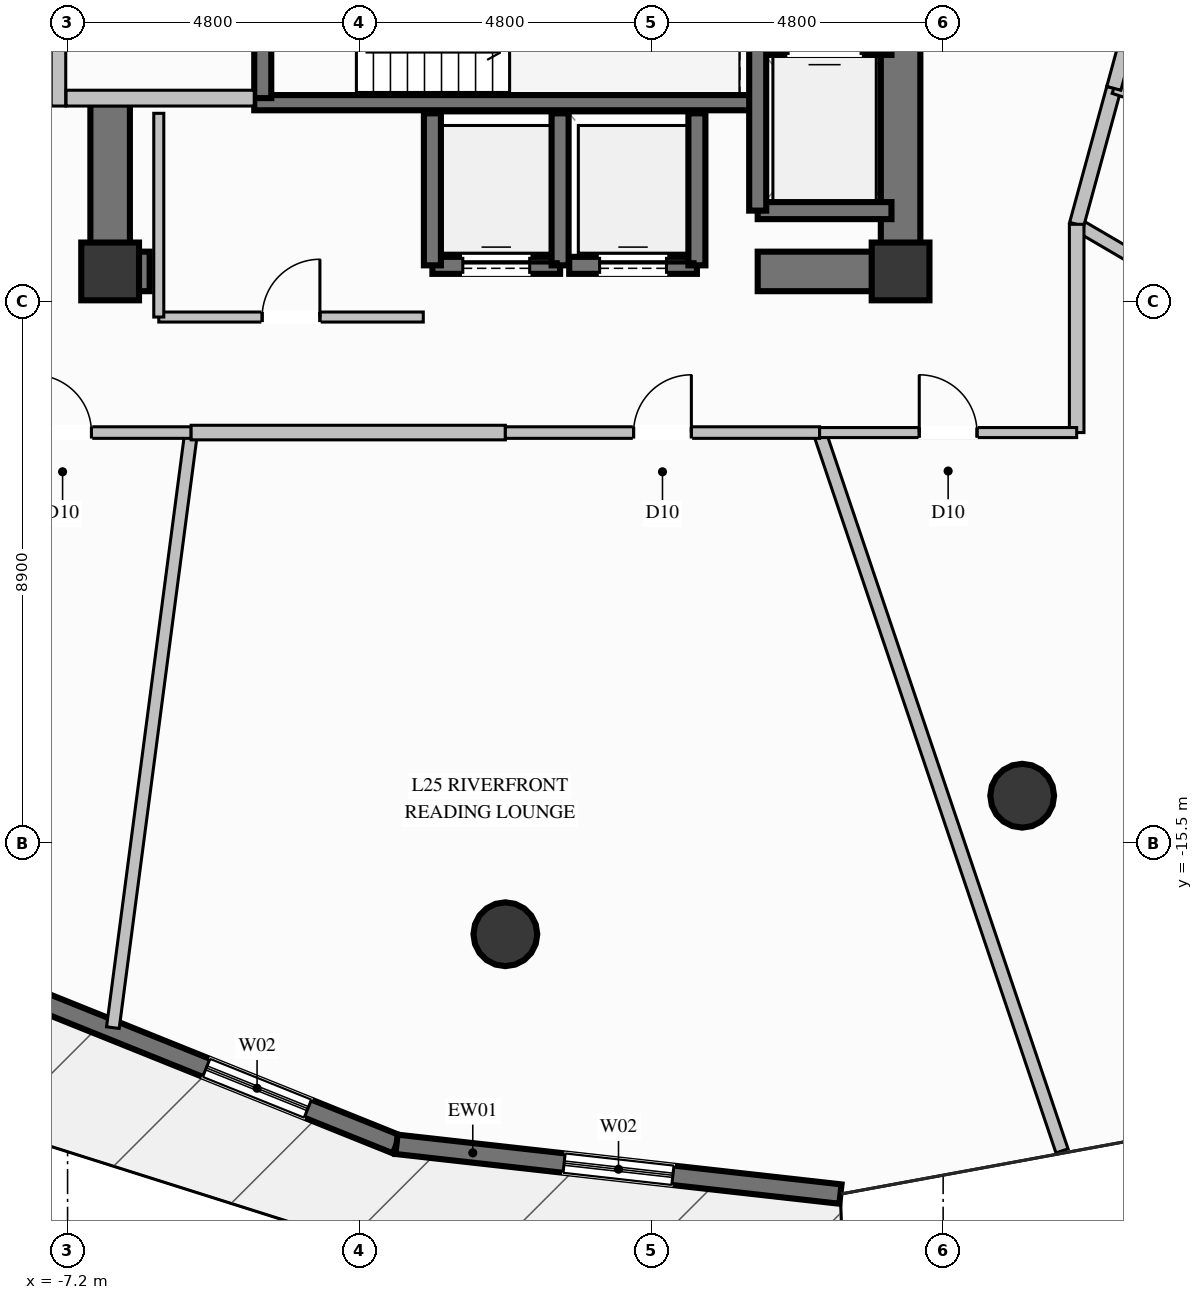
"""IFC4 building model, lengths in metres.
Left out: names, types, materials, properties, quantities, classifications, styles, units other than length and angle.
Written with IfcOpenShell. Run it as: python <this file> out.ifc"""

import sys

from ifc_helpers import new_model, si_unit, direction, frame, frame_2d, origin, origin_2d, place, context, subcontext, project, spatial, rectangle, circle, extrude, element, fill, save


model = new_model("IFC4")
c1 = context("Model", 3, precision=1e-05, world=origin(), true_north=direction((0.0, 1.0)))
c2 = subcontext(c1, "Body", "Model", "MODEL_VIEW")
j1 = project(units=[si_unit("LENGTHUNIT", "METRE"), si_unit("PLANEANGLEUNIT", "RADIAN")], contexts=[c1])
p1 = place(None, origin())
s1 = spatial("IfcSite", under=j1, at=p1, CompositionType="ELEMENT")
p2 = place(p1, origin())
s2 = spatial("IfcBuilding", under=s1, at=p2, CompositionType="ELEMENT")
p3 = place(p2, frame((0.0, 0.0, 102.6)))
s3 = spatial("IfcBuildingStorey", under=s2, at=p3, CompositionType="ELEMENT", Elevation=102.6)
for number, where, z_axis, x_axis in (
    (1, (-6.5, -6.1, 0.0), (0.0, 0.0, 1.0), (1.0, 0.0, 0.0)),
    (2, (6.5, -6.1, 0.0), (0.0, 0.0, 1.0), (1.0, 0.0, 0.0)),
):
    element("IfcColumn", number, at=place(p3, frame(where, z_axis=z_axis, x_axis=x_axis)), inside=s3, PredefinedType="COLUMN", context=c2, shape_type="SweptSolid", body=[
        extrude(rectangle(XDim=0.95, YDim=0.95, at=origin_2d()), origin(), (0.0, 0.0, 1.0), 3.6),
    ])
p4 = place(p3, frame((-4.13, -3.325, 0.0), z_axis=(0.0, 0.0, 1.0), x_axis=(1.0, 0.0, 0.0)))
e3 = element("IfcWall", 3, at=p4, inside=s3, PredefinedType="SOLIDWALL", context=c2, shape_type="SweptSolid", body=[
    extrude(rectangle(XDim=8.26, YDim=0.25, at=frame_2d((4.13, 0.0))), origin(), (0.0, 0.0, 1.0), 3.6),
])
p5 = place(p3, frame((-6.175, -6.1, 0.0), z_axis=(0.0, 0.0, 1.0), x_axis=(1.0, 0.0, 0.0)))
e4 = element("IfcWall", 4, at=p5, inside=s3, PredefinedType="SHEAR", context=c2, shape_type="SweptSolid", body=[
    extrude(rectangle(XDim=0.325, YDim=0.65, at=frame_2d((0.163, 0.0))), origin(), (0.0, 0.0, 1.0), 3.6),
])
p6 = place(p3, frame((4.15, -6.1, 0.0), z_axis=(0.0, 0.0, 1.0), x_axis=(1.0, 0.0, 0.0)))
e5 = element("IfcWall", 5, at=p6, inside=s3, PredefinedType="SHEAR", context=c2, shape_type="SweptSolid", body=[
    extrude(rectangle(XDim=2.025, YDim=0.65, at=frame_2d((1.013, 0.0))), origin(), (0.0, 0.0, 1.0), 3.6),
])
p7 = place(p3, frame((-6.5, -6.425, 0.0), z_axis=(0.0, 0.0, 1.0), x_axis=(0.0, 1.0, 0.0)))
e6 = element("IfcWall", 6, at=p7, inside=s3, PredefinedType="SHEAR", context=c2, shape_type="SweptSolid", body=[
    extrude(rectangle(XDim=3.075, YDim=0.65, at=frame_2d((1.538, 0.0))), origin(), (0.0, 0.0, 1.0), 3.6),
])
p8 = place(p3, frame((6.5, -6.425, 0.0), z_axis=(0.0, 0.0, 1.0), x_axis=(0.0, 1.0, 0.0)))
e7 = element("IfcWall", 7, at=p8, inside=s3, PredefinedType="SHEAR", context=c2, shape_type="SweptSolid", body=[
    extrude(rectangle(XDim=4.075, YDim=0.65, at=frame_2d((2.038, 0.0))), origin(), (0.0, 0.0, 1.0), 3.6),
])
for number, where, z_axis, x_axis in (
    (8, (0.0, -17.0, 0.0), (0.0, 0.0, 1.0), (1.0, 0.0, 0.0)),
    (9, (8.5, -14.722, 0.0), (0.0, 0.0, 1.0), (1.0, 0.0, 0.0)),
):
    element("IfcColumn", number, at=place(p3, frame(where, z_axis=z_axis, x_axis=x_axis)), inside=s3, PredefinedType="COLUMN", context=c2, shape_type="SweptSolid", body=[
        extrude(circle(Radius=0.525, at=origin_2d()), origin(), (0.0, 0.0, 1.0), 3.6),
    ])
p9 = place(p3, frame((-1.79, -20.455, 0.0), z_axis=(0.0, 0.0, 1.0), x_axis=(-0.927795739468, 0.373088549577, 0.0)))
e10 = element("IfcWall", 10, at=p9, inside=s3, PredefinedType="SOLIDWALL", context=c2, shape_type="SweptSolid", body=[
    extrude(rectangle(XDim=7.559, YDim=0.32, at=frame_2d((3.779, 0.0))), origin(), (0.0, 0.0, 1.0), 3.35),
])
p10 = place(p9, frame((1.572, 0.0, 0.35)))
e11 = element("IfcOpeningElement", 11, at=p10, cuts=e10, PredefinedType="OPENING", context=c2, shape_type="SweptSolid", body=[
    extrude(rectangle(XDim=1.8, YDim=2.6, at=frame_2d((0.9, 1.3))), frame((0.0, 0.17, 0.0), z_axis=(0.0, -1.0, 0.0), x_axis=(1.0, 0.0, 0.0)), (0.0, 0.0, 1.0), 0.34),
])
p11 = place(p3, frame((5.511, -21.273, 0.0), z_axis=(0.0, 0.0, 1.0), x_axis=(-0.993784044115, 0.111325081016, 0.0)))
e12 = element("IfcWall", 12, at=p11, inside=s3, PredefinedType="SOLIDWALL", context=c2, shape_type="SweptSolid", body=[
    extrude(rectangle(XDim=7.347, YDim=0.32, at=frame_2d((3.673, 0.0))), origin(), (0.0, 0.0, 1.0), 3.35),
])
p12 = place(p11, frame((2.773, 0.0, 0.35)))
e13 = element("IfcOpeningElement", 13, at=p12, cuts=e12, PredefinedType="OPENING", context=c2, shape_type="SweptSolid", body=[
    extrude(rectangle(XDim=1.8, YDim=2.6, at=frame_2d((0.9, 1.3))), frame((0.0, 0.17, 0.0), z_axis=(0.0, -1.0, 0.0), x_axis=(1.0, 0.0, 0.0)), (0.0, 0.0, 1.0), 0.34),
])
p13 = place(p3, frame((-1.2, -6.0, 0.0), z_axis=(0.0, 0.0, 1.0), x_axis=(1.0, 0.0, 0.0)))
e14 = element("IfcWall", 14, at=p13, inside=s3, PredefinedType="SOLIDWALL", context=c2, shape_type="SweptSolid", body=[
    extrude(rectangle(XDim=2.1, YDim=0.28, at=frame_2d((1.05, 0.0))), origin(), (0.0, 0.0, 1.0), 3.35),
])
p14 = place(p13, frame((0.5, 0.0, 0.0)))
e15 = element("IfcOpeningElement", 15, at=p14, cuts=e14, PredefinedType="OPENING", context=c2, shape_type="SweptSolid", body=[
    extrude(rectangle(XDim=1.1, YDim=2.2, at=frame_2d((0.55, 1.1))), frame((0.0, 0.15, 0.0), z_axis=(0.0, -1.0, 0.0), x_axis=(1.0, 0.0, 0.0)), (0.0, 0.0, 1.0), 0.3),
])
for number, where, z_axis, x_axis in (
    (16, (-1.2, -3.5, 0.0), (0.0, 0.0, 1.0), (0.0, -1.0, 0.0)),
    (17, (0.9, -6.0, 0.0), (0.0, 0.0, 1.0), (0.0, 1.0, 0.0)),
):
    element("IfcWall", number, at=place(p3, frame(where, z_axis=z_axis, x_axis=x_axis)), inside=s3, PredefinedType="SOLIDWALL", context=c2, shape_type="SweptSolid", body=[
        extrude(rectangle(XDim=2.5, YDim=0.28, at=frame_2d((1.25, 0.0))), origin(), (0.0, 0.0, 1.0), 3.35),
    ])
p15 = place(p3, frame((1.05, -6.0, 0.0), z_axis=(0.0, 0.0, 1.0), x_axis=(1.0, 0.0, 0.0)))
e18 = element("IfcWall", 18, at=p15, inside=s3, PredefinedType="SOLIDWALL", context=c2, shape_type="SweptSolid", body=[
    extrude(rectangle(XDim=2.1, YDim=0.28, at=frame_2d((1.05, 0.0))), origin(), (0.0, 0.0, 1.0), 3.35),
])
p16 = place(p15, frame((0.5, 0.0, 0.0)))
e19 = element("IfcOpeningElement", 19, at=p16, cuts=e18, PredefinedType="OPENING", context=c2, shape_type="SweptSolid", body=[
    extrude(rectangle(XDim=1.1, YDim=2.2, at=frame_2d((0.55, 1.1))), frame((0.0, 0.15, 0.0), z_axis=(0.0, -1.0, 0.0), x_axis=(1.0, 0.0, 0.0)), (0.0, 0.0, 1.0), 0.3),
])
p17 = place(p3, frame((3.15, -6.0, 0.0), z_axis=(0.0, 0.0, 1.0), x_axis=(0.0, 1.0, 0.0)))
e20 = element("IfcWall", 20, at=p17, inside=s3, PredefinedType="SOLIDWALL", context=c2, shape_type="SweptSolid", body=[
    extrude(rectangle(XDim=2.5, YDim=0.28, at=frame_2d((1.25, 0.0))), origin(), (0.0, 0.0, 1.0), 3.35),
])
p18 = place(p3, frame((4.15, -5.1, 0.0), z_axis=(0.0, 0.0, 1.0), x_axis=(1.0, 0.0, 0.0)))
e21 = element("IfcWall", 21, at=p18, inside=s3, PredefinedType="SOLIDWALL", context=c2, shape_type="SweptSolid", body=[
    extrude(rectangle(XDim=2.2, YDim=0.28, at=frame_2d((1.1, 0.0))), origin(), (0.0, 0.0, 1.0), 3.35),
])
p19 = place(p3, frame((6.35, -2.4, 0.0), z_axis=(0.0, 0.0, 1.0), x_axis=(-1.0, 0.0, 0.0)))
e22 = element("IfcWall", 22, at=p19, inside=s3, PredefinedType="SOLIDWALL", context=c2, shape_type="SweptSolid", body=[
    extrude(rectangle(XDim=2.2, YDim=0.28, at=frame_2d((1.1, 0.0))), origin(), (0.0, 0.0, 1.0), 3.35),
])
p20 = place(p19, frame((0.5, 0.0, 0.0)))
e23 = element("IfcOpeningElement", 23, at=p20, cuts=e22, PredefinedType="OPENING", context=c2, shape_type="SweptSolid", body=[
    extrude(rectangle(XDim=1.2, YDim=2.2, at=frame_2d((0.6, 1.1))), frame((0.0, 0.15, 0.0), z_axis=(0.0, -1.0, 0.0), x_axis=(1.0, 0.0, 0.0)), (0.0, 0.0, 1.0), 0.3),
])
p21 = place(p3, frame((4.15, -2.4, 0.0), z_axis=(0.0, 0.0, 1.0), x_axis=(0.0, -1.0, 0.0)))
e24 = element("IfcWall", 24, at=p21, inside=s3, PredefinedType="SOLIDWALL", context=c2, shape_type="SweptSolid", body=[
    extrude(rectangle(XDim=2.7, YDim=0.28, at=frame_2d((1.35, 0.0))), origin(), (0.0, 0.0, 1.0), 3.35),
])
p22 = place(p3, frame((-3.99, -3.25, 0.0), z_axis=(0.0, 0.0, 1.0), x_axis=(0.0, 1.0, 0.0)))
e25 = element("IfcWall", 25, at=p22, inside=s3, PredefinedType="SOLIDWALL", context=c2, shape_type="SweptSolid", body=[
    extrude(rectangle(XDim=5.46, YDim=0.28, at=frame_2d((2.73, 0.0))), origin(), (0.0, 0.0, 1.0), 3.35),
])
p23 = place(p22, frame((0.937, 0.0, 0.0)))
e26 = element("IfcOpeningElement", 26, at=p23, cuts=e25, PredefinedType="OPENING", context=c2, shape_type="SweptSolid", body=[
    extrude(rectangle(XDim=1.2, YDim=2.2, at=frame_2d((0.6, 1.1))), frame((0.0, 0.15, 0.0), z_axis=(0.0, -1.0, 0.0), x_axis=(1.0, 0.0, 0.0)), (0.0, 0.0, 1.0), 0.3),
])
p24 = place(p3, frame((-7.35, -3.38, 0.0), z_axis=(0.0, 0.0, 1.0), x_axis=(0.0, 1.0, 0.0)))
e27 = element("IfcWall", 27, at=p24, inside=s3, PredefinedType="PARTITIONING", context=c2, shape_type="SweptSolid", body=[
    extrude(rectangle(XDim=5.72, YDim=0.24, at=frame_2d((2.86, 0.0))), origin(), (0.0, 0.0, 1.0), 2.435),
])
p25 = place(p24, frame((1.599, 0.0, 0.0)))
e28 = element("IfcOpeningElement", 28, at=p25, cuts=e27, PredefinedType="OPENING", context=c2, shape_type="SweptSolid", body=[
    extrude(rectangle(XDim=1.15, YDim=2.2, at=frame_2d((0.575, 1.1))), frame((0.0, 0.13, 0.0), z_axis=(0.0, -1.0, 0.0), x_axis=(1.0, 0.0, 0.0)), (0.0, 0.0, 1.0), 0.26),
])
p26 = place(p3, frame((-7.225, -3.25, 0.0), z_axis=(0.0, 0.0, 1.0), x_axis=(1.0, 0.0, 0.0)))
e29 = element("IfcWall", 29, at=p26, inside=s3, PredefinedType="PARTITIONING", context=c2, shape_type="SweptSolid", body=[
    extrude(rectangle(XDim=3.095, YDim=0.26, at=frame_2d((1.548, 0.0))), origin(), (0.0, 0.0, 1.0), 3.35),
])
p27 = place(p3, frame((-5.7, -6.85, 0.0), z_axis=(0.0, 0.0, 1.0), x_axis=(1.0, 0.0, 0.0)))
e30 = element("IfcWall", 30, at=p27, inside=s3, PredefinedType="PARTITIONING", context=c2, shape_type="SweptSolid", body=[
    extrude(rectangle(XDim=4.35, YDim=0.165, at=frame_2d((2.175, 0.0))), origin(), (0.0, 0.0, 1.0), 2.435),
])
p28 = place(p27, frame((1.7, 0.0, 0.0)))
e31 = element("IfcOpeningElement", 31, at=p28, cuts=e30, PredefinedType="OPENING", context=c2, shape_type="SweptSolid", body=[
    extrude(rectangle(XDim=0.95, YDim=2.1, at=frame_2d((0.475, 1.05))), frame((0.0, 0.093, 0.0), z_axis=(0.0, -1.0, 0.0), x_axis=(1.0, 0.0, 0.0)), (0.0, 0.0, 1.0), 0.185),
])
p29 = place(p3, frame((-5.7, -3.5, 0.0), z_axis=(0.0, 0.0, 1.0), x_axis=(0.0, -1.0, 0.0)))
e32 = element("IfcWall", 32, at=p29, inside=s3, PredefinedType="PARTITIONING", context=c2, shape_type="SweptSolid", body=[
    extrude(rectangle(XDim=3.35, YDim=0.165, at=frame_2d((1.675, 0.0))), origin(), (0.0, 0.0, 1.0), 2.435),
])
p30 = place(p3, frame((9.396, -5.325, 0.0), z_axis=(0.0, 0.0, 1.0), x_axis=(0.862912125579, -0.505353998232, 0.0)))
e33 = element("IfcWall", 33, at=p30, inside=s3, PredefinedType="PARTITIONING", context=c2, shape_type="SweptSolid", body=[
    extrude(rectangle(XDim=5.658, YDim=0.21, at=frame_2d((2.829, 0.0))), origin(), (0.0, 0.0, 1.0), 2.791),
])
p31 = place(p3, frame((9.396, -5.325, 0.0), z_axis=(0.0, 0.0, 1.0), x_axis=(0.263643210908, 0.964620265878, 0.0)))
e34 = element("IfcWall", 34, at=p31, inside=s3, PredefinedType="PARTITIONING", context=c2, shape_type="SweptSolid", body=[
    extrude(rectangle(XDim=2.318, YDim=0.24, at=frame_2d((1.159, 0.0))), origin(), (0.0, 0.0, 1.0), 3.35),
])
p32 = place(p3, frame((10.007, -3.089, 0.0), z_axis=(0.0, 0.0, 1.0), x_axis=(0.949827092004, -0.312775471057, 0.0)))
e35 = element("IfcWall", 35, at=p32, inside=s3, PredefinedType="PLUMBINGWALL", context=c2, shape_type="SweptSolid", body=[
    extrude(rectangle(XDim=4.543, YDim=0.175, at=frame_2d((2.271, 0.0))), origin(), (0.0, 0.0, 1.0), 3.35),
])
p33 = place(p32, frame((1.821, 0.0, 0.0)))
e36 = element("IfcOpeningElement", 36, at=p33, cuts=e35, PredefinedType="OPENING", context=c2, shape_type="SweptSolid", body=[
    extrude(rectangle(XDim=0.9, YDim=2.1, at=frame_2d((0.45, 1.05))), frame((0.0, 0.098, 0.0), z_axis=(0.0, -1.0, 0.0), x_axis=(1.0, 0.0, 0.0)), (0.0, 0.0, 1.0), 0.195),
])
p34 = place(p3, frame((10.007, -3.089, 0.0), z_axis=(0.0, 0.0, 1.0), x_axis=(0.263272237376, 0.964721581093, 0.0)))
e37 = element("IfcWall", 37, at=p34, inside=s3, PredefinedType="PARTITIONING", context=c2, shape_type="SweptSolid", body=[
    extrude(rectangle(XDim=3.202, YDim=0.24, at=frame_2d((1.601, 0.0))), origin(), (0.0, 0.0, 1.0), 2.985),
])
p35 = place(p34, frame((1.101, 0.0, 0.0)))
e38 = element("IfcOpeningElement", 38, at=p35, cuts=e37, PredefinedType="OPENING", context=c2, shape_type="SweptSolid", body=[
    extrude(rectangle(XDim=1.0, YDim=2.2, at=frame_2d((0.5, 1.1))), frame((0.0, 0.13, 0.0), z_axis=(0.0, -1.0, 0.0), x_axis=(1.0, 0.0, 0.0)), (0.0, 0.0, 1.0), 0.26),
])
p36 = place(p3, frame((-5.168, -8.75, 0.0), z_axis=(0.0, 0.0, 1.0), x_axis=(-0.130403964366, -0.991460945311, 0.0)))
e39 = element("IfcWall", 39, at=p36, inside=s3, PredefinedType="PARTITIONING", context=c2, shape_type="SweptSolid", body=[
    extrude(rectangle(XDim=9.87, YDim=0.21, at=frame_2d((4.935, 0.0))), origin(), (0.0, 0.0, 1.0), 3.35),
])
p37 = place(p3, frame((-9.396, -8.75, 0.0), z_axis=(0.0, 0.0, 1.0), x_axis=(1.0, 0.0, 0.0)))
e40 = element("IfcWall", 40, at=p37, inside=s3, PredefinedType="PARTITIONING", context=c2, shape_type="SweptSolid", body=[
    extrude(rectangle(XDim=4.228, YDim=0.19, at=frame_2d((2.114, 0.0))), origin(), (0.0, 0.0, 1.0), 3.35),
])
p38 = place(p37, frame((1.639, 0.0, 0.0)))
e41 = element("IfcOpeningElement", 41, at=p38, cuts=e40, PredefinedType="OPENING", context=c2, shape_type="SweptSolid", body=[
    extrude(rectangle(XDim=0.95, YDim=2.1, at=frame_2d((0.475, 1.05))), frame((0.0, 0.105, 0.0), z_axis=(0.0, -1.0, 0.0), x_axis=(1.0, 0.0, 0.0)), (0.0, 0.0, 1.0), 0.21),
])
p39 = place(p3, frame((5.168, -8.75, 0.0), z_axis=(0.0, 0.0, 1.0), x_axis=(0.319791389232, -0.947487977429, 0.0)))
e42 = element("IfcWall", 42, at=p39, inside=s3, PredefinedType="PARTITIONING", context=c2, shape_type="SweptSolid", body=[
    extrude(rectangle(XDim=12.468, YDim=0.21, at=frame_2d((6.234, 0.0))), origin(), (0.0, 0.0, 1.0), 3.35),
])
p40 = place(p3, frame((-5.168, -8.75, 0.0), z_axis=(0.0, 0.0, 1.0), x_axis=(1.0, 0.0, 0.0)))
e43 = element("IfcWall", 43, at=p40, inside=s3, PredefinedType="PARTITIONING", context=c2, shape_type="SweptSolid", body=[
    extrude(rectangle(XDim=5.168, YDim=0.24, at=frame_2d((2.584, 0.0))), origin(), (0.0, 0.0, 1.0), 3.35),
])
p41 = place(p3, frame((0.0, -8.75, 0.0), z_axis=(0.0, 0.0, 1.0), x_axis=(1.0, 0.0, 0.0)))
e44 = element("IfcWall", 44, at=p41, inside=s3, PredefinedType="PARTITIONING", context=c2, shape_type="SweptSolid", body=[
    extrude(rectangle(XDim=5.168, YDim=0.19, at=frame_2d((2.584, 0.0))), origin(), (0.0, 0.0, 1.0), 3.35),
])
p42 = place(p41, frame((2.109, 0.0, 0.0)))
e45 = element("IfcOpeningElement", 45, at=p42, cuts=e44, PredefinedType="OPENING", context=c2, shape_type="SweptSolid", body=[
    extrude(rectangle(XDim=0.95, YDim=2.1, at=frame_2d((0.475, 1.05))), frame((0.0, 0.105, 0.0), z_axis=(0.0, -1.0, 0.0), x_axis=(1.0, 0.0, 0.0)), (0.0, 0.0, 1.0), 0.21),
])
p43 = place(p3, frame((9.396, -8.75, 0.0), z_axis=(0.0, 0.0, 1.0), x_axis=(0.0, 1.0, 0.0)))
e46 = element("IfcWall", 46, at=p43, inside=s3, PredefinedType="PARTITIONING", context=c2, shape_type="SweptSolid", body=[
    extrude(rectangle(XDim=3.425, YDim=0.24, at=frame_2d((1.712, 0.0))), origin(), (0.0, 0.0, 1.0), 3.35),
])
p44 = place(p3, frame((5.168, -8.75, 0.0), z_axis=(0.0, 0.0, 1.0), x_axis=(1.0, 0.0, 0.0)))
e47 = element("IfcWall", 47, at=p44, inside=s3, PredefinedType="PARTITIONING", context=c2, shape_type="SweptSolid", body=[
    extrude(rectangle(XDim=4.228, YDim=0.165, at=frame_2d((2.114, 0.0))), origin(), (0.0, 0.0, 1.0), 3.35),
])
p45 = place(p44, frame((1.639, 0.0, 0.0)))
e48 = element("IfcOpeningElement", 48, at=p45, cuts=e47, PredefinedType="OPENING", context=c2, shape_type="SweptSolid", body=[
    extrude(rectangle(XDim=0.95, YDim=2.1, at=frame_2d((0.475, 1.05))), frame((0.0, 0.093, 0.0), z_axis=(0.0, -1.0, 0.0), x_axis=(1.0, 0.0, 0.0)), (0.0, 0.0, 1.0), 0.185),
])
p46 = place(p10, origin())
e49 = element("IfcWindow", 49, at=p46, inside=s3, PartitioningType="SINGLE_PANEL", PredefinedType="WINDOW", context=c2, shape_type="SweptSolid", body=[
    extrude(rectangle(XDim=1.8, YDim=2.6, at=frame_2d((0.9, 1.3))), frame((0.0, 0.03, 0.0), z_axis=(0.0, -1.0, 0.0), x_axis=(1.0, 0.0, 0.0)), (0.0, 0.0, 1.0), 0.06),
])
fill(e11, e49)
p47 = place(p12, origin())
e50 = element("IfcWindow", 50, at=p47, inside=s3, PartitioningType="SINGLE_PANEL", PredefinedType="WINDOW", context=c2, shape_type="SweptSolid", body=[
    extrude(rectangle(XDim=1.8, YDim=2.6, at=frame_2d((0.9, 1.3))), frame((0.0, 0.03, 0.0), z_axis=(0.0, -1.0, 0.0), x_axis=(1.0, 0.0, 0.0)), (0.0, 0.0, 1.0), 0.06),
])
fill(e13, e50)
p48 = place(p14, origin())
e51 = element("IfcDoor", 51, at=p48, inside=s3, OperationType="SLIDING_TO_LEFT", PredefinedType="DOOR", context=c2, shape_type="SweptSolid", body=[
    extrude(rectangle(XDim=1.1, YDim=2.2, at=frame_2d((0.55, 1.1))), frame((0.0, 0.025, 0.0), z_axis=(0.0, -1.0, 0.0), x_axis=(1.0, 0.0, 0.0)), (0.0, 0.0, 1.0), 0.05),
])
fill(e15, e51)
p49 = place(p16, origin())
e52 = element("IfcDoor", 52, at=p49, inside=s3, OperationType="SLIDING_TO_LEFT", PredefinedType="DOOR", context=c2, shape_type="SweptSolid", body=[
    extrude(rectangle(XDim=1.1, YDim=2.2, at=frame_2d((0.55, 1.1))), frame((0.0, 0.025, 0.0), z_axis=(0.0, -1.0, 0.0), x_axis=(1.0, 0.0, 0.0)), (0.0, 0.0, 1.0), 0.05),
])
fill(e19, e52)
p50 = place(p28, origin())
e53 = element("IfcDoor", 53, at=p50, inside=s3, OperationType="SINGLE_SWING_RIGHT", PredefinedType="DOOR", context=c2, shape_type="SweptSolid", body=[
    extrude(rectangle(XDim=0.95, YDim=2.1, at=frame_2d((0.475, 1.05))), frame((0.0, 0.025, 0.0), z_axis=(0.0, -1.0, 0.0), x_axis=(1.0, 0.0, 0.0)), (0.0, 0.0, 1.0), 0.05),
])
fill(e31, e53)
p51 = place(p38, origin())
e54 = element("IfcDoor", 54, at=p51, inside=s3, OperationType="SINGLE_SWING_LEFT", PredefinedType="DOOR", context=c2, shape_type="SweptSolid", body=[
    extrude(rectangle(XDim=0.95, YDim=2.1, at=frame_2d((0.475, 1.05))), frame((0.0, 0.025, 0.0), z_axis=(0.0, -1.0, 0.0), x_axis=(1.0, 0.0, 0.0)), (0.0, 0.0, 1.0), 0.05),
])
fill(e41, e54)
p52 = place(p42, origin())
e55 = element("IfcDoor", 55, at=p52, inside=s3, OperationType="SINGLE_SWING_RIGHT", PredefinedType="DOOR", context=c2, shape_type="SweptSolid", body=[
    extrude(rectangle(XDim=0.95, YDim=2.1, at=frame_2d((0.475, 1.05))), frame((0.0, 0.025, 0.0), z_axis=(0.0, -1.0, 0.0), x_axis=(1.0, 0.0, 0.0)), (0.0, 0.0, 1.0), 0.05),
])
fill(e45, e55)
p53 = place(p45, origin())
e56 = element("IfcDoor", 56, at=p53, inside=s3, OperationType="SINGLE_SWING_LEFT", PredefinedType="DOOR", context=c2, shape_type="SweptSolid", body=[
    extrude(rectangle(XDim=0.95, YDim=2.1, at=frame_2d((0.475, 1.05))), frame((0.0, 0.025, 0.0), z_axis=(0.0, -1.0, 0.0), x_axis=(1.0, 0.0, 0.0)), (0.0, 0.0, 1.0), 0.05),
])
fill(e48, e56)
save(model, sys.argv[1])
